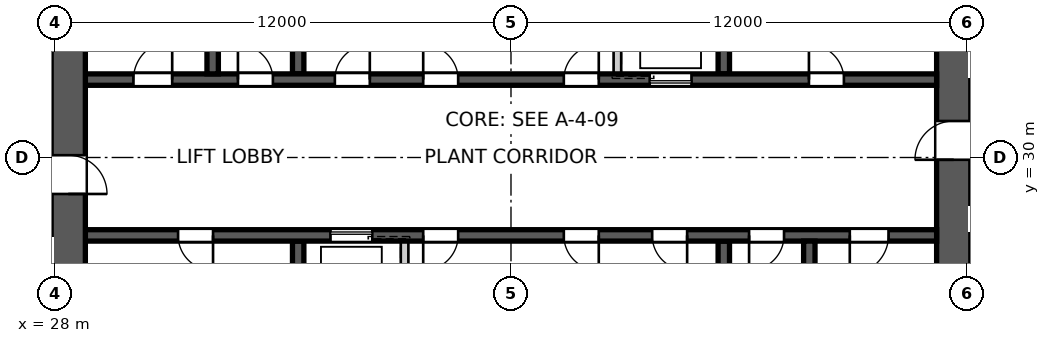
"""IFC4 building model, lengths in metres.
Left out: names, types, materials, properties, quantities, classifications, styles, units other than length and angle.
Written with IfcOpenShell. Run it as: python <this file> out.ifc"""

import sys

from ifc_helpers import new_model, si_unit, direction, frame, frame_2d, origin, place, context, subcontext, project, spatial, polyline, rectangle, outline, extrude, element, fill, save


model = new_model("IFC4")
c1 = context("Model", 3, precision=1e-05, world=origin(), true_north=direction((0.0, 1.0)))
c2 = subcontext(c1, "Body", "Model", "MODEL_VIEW")
j1 = project(units=[si_unit("LENGTHUNIT", "METRE"), si_unit("PLANEANGLEUNIT", "RADIAN")], contexts=[c1])
p1 = place(None, origin())
s1 = spatial("IfcSite", under=j1, at=p1, CompositionType="ELEMENT")
p2 = place(p1, origin())
s2 = spatial("IfcBuilding", under=s1, at=p2, CompositionType="ELEMENT")
p3 = place(p2, frame((0.0, 0.0, 304.3)))
s3 = spatial("IfcBuildingStorey", under=s2, at=p3, CompositionType="ELEMENT", Elevation=304.3)
p4 = place(p3, frame((51.65, 18.8, 0.0), z_axis=(0.0, 0.0, 1.0), x_axis=(0.0, 1.0, 0.0)))
e1 = element("IfcWall", 1, at=p4, inside=s3, PredefinedType="SHEAR", context=c2, shape_type="SweptSolid", body=[
    extrude(outline(polyline([(0.0, -0.45), (22.4, -0.45), (22.4, -0.025), (22.85, -0.025), (22.85, 0.025), (22.4, 0.025), (22.4, 0.45), (0.0, 0.45), (0.0, 0.025), (-0.45, 0.025), (-0.45, -0.025), (0.0, -0.025), (0.0, -0.45)])), origin(), (0.0, 0.0, 1.0), 4.5),
])
p5 = place(p4, frame((11.14, 0.0, 0.0)))
e2 = element("IfcOpeningElement", 2, at=p5, cuts=e1, PredefinedType="OPENING", context=c2, shape_type="SweptSolid", body=[
    extrude(rectangle(XDim=1.02, YDim=2.4, at=frame_2d((0.51, 1.2))), frame((0.0, 0.46, 0.0), z_axis=(0.0, -1.0, 0.0), x_axis=(1.0, 0.0, 0.0)), (0.0, 0.0, 1.0), 0.92),
])
p6 = place(p3, frame((28.35, 41.2, 0.0), z_axis=(0.0, 0.0, 1.0), x_axis=(0.0, -1.0, 0.0)))
e3 = element("IfcWall", 3, at=p6, inside=s3, PredefinedType="SHEAR", context=c2, shape_type="SweptSolid", body=[
    extrude(outline(polyline([(0.0, -0.45), (22.4, -0.45), (22.4, -0.025), (22.85, -0.025), (22.85, 0.025), (22.4, 0.025), (22.4, 0.45), (0.0, 0.45), (0.0, 0.025), (-0.45, 0.025), (-0.45, -0.025), (0.0, -0.025), (0.0, -0.45)])), origin(), (0.0, 0.0, 1.0), 4.5),
])
p7 = place(p6, frame((11.14, 0.0, 0.0)))
e4 = element("IfcOpeningElement", 4, at=p7, cuts=e3, PredefinedType="OPENING", context=c2, shape_type="SweptSolid", body=[
    extrude(rectangle(XDim=1.02, YDim=2.4, at=frame_2d((0.51, 1.2))), frame((0.0, 0.46, 0.0), z_axis=(0.0, -1.0, 0.0), x_axis=(1.0, 0.0, 0.0)), (0.0, 0.0, 1.0), 0.92),
])
p8 = place(p3, frame((28.8, 32.05, 0.0), z_axis=(0.0, 0.0, 1.0), x_axis=(1.0, 0.0, 0.0)))
e5 = element("IfcWall", 5, at=p8, inside=s3, PredefinedType="SHEAR", context=c2, shape_type="SweptSolid", body=[
    extrude(rectangle(XDim=22.4, YDim=0.3, at=frame_2d((11.2, 0.0))), origin(), (0.0, 0.0, 1.0), 4.5),
])
p9 = place(p8, frame((19.04, 0.0, 0.0)))
e6 = element("IfcOpeningElement", 6, at=p9, cuts=e5, PredefinedType="OPENING", context=c2, shape_type="SweptSolid", body=[
    extrude(rectangle(XDim=0.92, YDim=2.1, at=frame_2d((0.46, 1.05))), frame((0.0, 0.16, 0.0), z_axis=(0.0, -1.0, 0.0), x_axis=(1.0, 0.0, 0.0)), (0.0, 0.0, 1.0), 0.32),
])
p10 = place(p8, frame((1.265, 0.0, 0.0)))
e7 = element("IfcOpeningElement", 7, at=p10, cuts=e5, PredefinedType="OPENING", context=c2, shape_type="SweptSolid", body=[
    extrude(rectangle(XDim=1.02, YDim=2.1, at=frame_2d((0.51, 1.05))), frame((0.0, 0.16, 0.0), z_axis=(0.0, -1.0, 0.0), x_axis=(1.0, 0.0, 0.0)), (0.0, 0.0, 1.0), 0.32),
])
p11 = place(p8, frame((4.015, 0.0, 0.0)))
e8 = element("IfcOpeningElement", 8, at=p11, cuts=e5, PredefinedType="OPENING", context=c2, shape_type="SweptSolid", body=[
    extrude(rectangle(XDim=0.92, YDim=2.1, at=frame_2d((0.46, 1.05))), frame((0.0, 0.16, 0.0), z_axis=(0.0, -1.0, 0.0), x_axis=(1.0, 0.0, 0.0)), (0.0, 0.0, 1.0), 0.32),
])
p12 = place(p8, frame((6.565, 0.0, 0.0)))
e9 = element("IfcOpeningElement", 9, at=p12, cuts=e5, PredefinedType="OPENING", context=c2, shape_type="SweptSolid", body=[
    extrude(rectangle(XDim=0.92, YDim=2.1, at=frame_2d((0.46, 1.05))), frame((0.0, 0.16, 0.0), z_axis=(0.0, -1.0, 0.0), x_axis=(1.0, 0.0, 0.0)), (0.0, 0.0, 1.0), 0.32),
])
p13 = place(p8, frame((8.89, 0.0, 0.0)))
e10 = element("IfcOpeningElement", 10, at=p13, cuts=e5, PredefinedType="OPENING", context=c2, shape_type="SweptSolid", body=[
    extrude(rectangle(XDim=0.92, YDim=2.1, at=frame_2d((0.46, 1.05))), frame((0.0, 0.16, 0.0), z_axis=(0.0, -1.0, 0.0), x_axis=(1.0, 0.0, 0.0)), (0.0, 0.0, 1.0), 0.32),
])
p14 = place(p8, frame((12.59, 0.0, 0.0)))
e11 = element("IfcOpeningElement", 11, at=p14, cuts=e5, PredefinedType="OPENING", context=c2, shape_type="SweptSolid", body=[
    extrude(rectangle(XDim=0.92, YDim=2.1, at=frame_2d((0.46, 1.05))), frame((0.0, 0.16, 0.0), z_axis=(0.0, -1.0, 0.0), x_axis=(1.0, 0.0, 0.0)), (0.0, 0.0, 1.0), 0.32),
])
p15 = place(p8, frame((14.85, 0.0, 0.0)))
e12 = element("IfcOpeningElement", 12, at=p15, cuts=e5, PredefinedType="OPENING", context=c2, shape_type="SweptSolid", body=[
    extrude(rectangle(XDim=1.1, YDim=2.1, at=frame_2d((0.55, 1.05))), frame((0.0, 0.16, 0.0), z_axis=(0.0, -1.0, 0.0), x_axis=(1.0, 0.0, 0.0)), (0.0, 0.0, 1.0), 0.32),
])
p16 = place(p3, frame((51.2, 27.95, 0.0), z_axis=(0.0, 0.0, 1.0), x_axis=(-1.0, 0.0, 0.0)))
e13 = element("IfcWall", 13, at=p16, inside=s3, PredefinedType="SHEAR", context=c2, shape_type="SweptSolid", body=[
    extrude(rectangle(XDim=22.4, YDim=0.3, at=frame_2d((11.2, 0.0))), origin(), (0.0, 0.0, 1.0), 4.5),
])
p17 = place(p16, frame((19.04, 0.0, 0.0)))
e14 = element("IfcOpeningElement", 14, at=p17, cuts=e13, PredefinedType="OPENING", context=c2, shape_type="SweptSolid", body=[
    extrude(rectangle(XDim=0.92, YDim=2.1, at=frame_2d((0.46, 1.05))), frame((0.0, 0.16, 0.0), z_axis=(0.0, -1.0, 0.0), x_axis=(1.0, 0.0, 0.0)), (0.0, 0.0, 1.0), 0.32),
])
p18 = place(p16, frame((1.265, 0.0, 0.0)))
e15 = element("IfcOpeningElement", 15, at=p18, cuts=e13, PredefinedType="OPENING", context=c2, shape_type="SweptSolid", body=[
    extrude(rectangle(XDim=1.02, YDim=2.1, at=frame_2d((0.51, 1.05))), frame((0.0, 0.16, 0.0), z_axis=(0.0, -1.0, 0.0), x_axis=(1.0, 0.0, 0.0)), (0.0, 0.0, 1.0), 0.32),
])
p19 = place(p16, frame((4.015, 0.0, 0.0)))
e16 = element("IfcOpeningElement", 16, at=p19, cuts=e13, PredefinedType="OPENING", context=c2, shape_type="SweptSolid", body=[
    extrude(rectangle(XDim=0.92, YDim=2.1, at=frame_2d((0.46, 1.05))), frame((0.0, 0.16, 0.0), z_axis=(0.0, -1.0, 0.0), x_axis=(1.0, 0.0, 0.0)), (0.0, 0.0, 1.0), 0.32),
])
p20 = place(p16, frame((12.59, 0.0, 0.0)))
e17 = element("IfcOpeningElement", 17, at=p20, cuts=e13, PredefinedType="OPENING", context=c2, shape_type="SweptSolid", body=[
    extrude(rectangle(XDim=0.92, YDim=2.1, at=frame_2d((0.46, 1.05))), frame((0.0, 0.16, 0.0), z_axis=(0.0, -1.0, 0.0), x_axis=(1.0, 0.0, 0.0)), (0.0, 0.0, 1.0), 0.32),
])
p21 = place(p16, frame((8.89, 0.0, 0.0)))
e18 = element("IfcOpeningElement", 18, at=p21, cuts=e13, PredefinedType="OPENING", context=c2, shape_type="SweptSolid", body=[
    extrude(rectangle(XDim=0.92, YDim=2.1, at=frame_2d((0.46, 1.05))), frame((0.0, 0.16, 0.0), z_axis=(0.0, -1.0, 0.0), x_axis=(1.0, 0.0, 0.0)), (0.0, 0.0, 1.0), 0.32),
])
p22 = place(p16, frame((6.565, 0.0, 0.0)))
e19 = element("IfcOpeningElement", 19, at=p22, cuts=e13, PredefinedType="OPENING", context=c2, shape_type="SweptSolid", body=[
    extrude(rectangle(XDim=0.92, YDim=2.1, at=frame_2d((0.46, 1.05))), frame((0.0, 0.16, 0.0), z_axis=(0.0, -1.0, 0.0), x_axis=(1.0, 0.0, 0.0)), (0.0, 0.0, 1.0), 0.32),
])
p23 = place(p16, frame((14.85, 0.0, 0.0)))
e20 = element("IfcOpeningElement", 20, at=p23, cuts=e13, PredefinedType="OPENING", context=c2, shape_type="SweptSolid", body=[
    extrude(rectangle(XDim=1.1, YDim=2.1, at=frame_2d((0.55, 1.05))), frame((0.0, 0.16, 0.0), z_axis=(0.0, -1.0, 0.0), x_axis=(1.0, 0.0, 0.0)), (0.0, 0.0, 1.0), 0.32),
])
for number, where, z_axis, x_axis in (
    (21, (34.4, 32.2, 0.0), (0.0, 0.0, 1.0), (0.0, 1.0, 0.0)),
    (22, (45.6, 27.8, 0.0), (0.0, 0.0, 1.0), (0.0, -1.0, 0.0)),
):
    element("IfcWall", number, at=place(p3, frame(where, z_axis=z_axis, x_axis=x_axis)), inside=s3, PredefinedType="SHEAR", context=c2, shape_type="SweptSolid", body=[
        extrude(rectangle(XDim=2.8, YDim=0.3, at=frame_2d((1.4, 0.0))), origin(), (0.0, 0.0, 1.0), 4.5),
    ])
for number, where, z_axis, x_axis in (
    (23, (42.8, 32.2, 0.0), (0.0, 0.0, 1.0), (0.0, 1.0, 0.0)),
    (24, (37.2, 27.8, 0.0), (0.0, 0.0, 1.0), (0.0, -1.0, 0.0)),
):
    element("IfcWall", number, at=place(p3, frame(where, z_axis=z_axis, x_axis=x_axis)), inside=s3, PredefinedType="SOLIDWALL", context=c2, shape_type="SweptSolid", body=[
        extrude(rectangle(XDim=2.8, YDim=0.2, at=frame_2d((1.4, 0.0))), origin(), (0.0, 0.0, 1.0), 4.5),
    ])
for number, where, z_axis, x_axis in (
    (25, (45.6, 32.2, 0.0), (0.0, 0.0, 1.0), (0.0, 1.0, 0.0)),
    (26, (34.4, 27.8, 0.0), (0.0, 0.0, 1.0), (0.0, -1.0, 0.0)),
):
    element("IfcWall", number, at=place(p3, frame(where, z_axis=z_axis, x_axis=x_axis)), inside=s3, PredefinedType="SHEAR", context=c2, shape_type="SweptSolid", body=[
        extrude(rectangle(XDim=2.8, YDim=0.3, at=frame_2d((1.4, 0.0))), origin(), (0.0, 0.0, 1.0), 4.5),
    ])
for number, where, z_axis, x_axis in (
    (27, (32.15, 32.2, 0.0), (0.0, 0.0, 1.0), (0.0, 1.0, 0.0)),
    (28, (47.85, 27.8, 0.0), (0.0, 0.0, 1.0), (0.0, -1.0, 0.0)),
):
    element("IfcWall", number, at=place(p3, frame(where, z_axis=z_axis, x_axis=x_axis)), inside=s3, PredefinedType="SHEAR", context=c2, shape_type="SweptSolid", body=[
        extrude(rectangle(XDim=7.7, YDim=0.3, at=frame_2d((3.85, 0.0))), origin(), (0.0, 0.0, 1.0), 4.5),
    ])
p24 = place(p9, origin())
e29 = element("IfcDoor", 29, at=p24, inside=s3, OperationType="SINGLE_SWING_LEFT", PredefinedType="DOOR", context=c2, shape_type="SweptSolid", body=[
    extrude(rectangle(XDim=0.92, YDim=2.1, at=frame_2d((0.46, 1.05))), frame((0.0, 0.025, 0.0), z_axis=(0.0, -1.0, 0.0), x_axis=(1.0, 0.0, 0.0)), (0.0, 0.0, 1.0), 0.05),
])
fill(e6, e29)
p25 = place(p17, origin())
e30 = element("IfcDoor", 30, at=p25, inside=s3, OperationType="SINGLE_SWING_LEFT", PredefinedType="DOOR", context=c2, shape_type="SweptSolid", body=[
    extrude(rectangle(XDim=0.92, YDim=2.1, at=frame_2d((0.46, 1.05))), frame((0.0, 0.025, 0.0), z_axis=(0.0, -1.0, 0.0), x_axis=(1.0, 0.0, 0.0)), (0.0, 0.0, 1.0), 0.05),
])
fill(e14, e30)
p26 = place(p18, origin())
e31 = element("IfcDoor", 31, at=p26, inside=s3, OperationType="SINGLE_SWING_RIGHT", PredefinedType="DOOR", context=c2, shape_type="SweptSolid", body=[
    extrude(rectangle(XDim=1.02, YDim=2.1, at=frame_2d((0.51, 1.05))), frame((0.0, 0.025, 0.0), z_axis=(0.0, -1.0, 0.0), x_axis=(1.0, 0.0, 0.0)), (0.0, 0.0, 1.0), 0.05),
])
fill(e15, e31)
p27 = place(p10, origin())
e32 = element("IfcDoor", 32, at=p27, inside=s3, OperationType="SINGLE_SWING_RIGHT", PredefinedType="DOOR", context=c2, shape_type="SweptSolid", body=[
    extrude(rectangle(XDim=1.02, YDim=2.1, at=frame_2d((0.51, 1.05))), frame((0.0, 0.025, 0.0), z_axis=(0.0, -1.0, 0.0), x_axis=(1.0, 0.0, 0.0)), (0.0, 0.0, 1.0), 0.05),
])
fill(e7, e32)
p28 = place(p11, origin())
e33 = element("IfcDoor", 33, at=p28, inside=s3, OperationType="SINGLE_SWING_LEFT", PredefinedType="DOOR", context=c2, shape_type="SweptSolid", body=[
    extrude(rectangle(XDim=0.92, YDim=2.1, at=frame_2d((0.46, 1.05))), frame((0.0, 0.025, 0.0), z_axis=(0.0, -1.0, 0.0), x_axis=(1.0, 0.0, 0.0)), (0.0, 0.0, 1.0), 0.05),
])
fill(e8, e33)
p29 = place(p19, origin())
e34 = element("IfcDoor", 34, at=p29, inside=s3, OperationType="SINGLE_SWING_RIGHT", PredefinedType="DOOR", context=c2, shape_type="SweptSolid", body=[
    extrude(rectangle(XDim=0.92, YDim=2.1, at=frame_2d((0.46, 1.05))), frame((0.0, 0.025, 0.0), z_axis=(0.0, -1.0, 0.0), x_axis=(1.0, 0.0, 0.0)), (0.0, 0.0, 1.0), 0.05),
])
fill(e16, e34)
p30 = place(p12, origin())
e35 = element("IfcDoor", 35, at=p30, inside=s3, OperationType="SINGLE_SWING_RIGHT", PredefinedType="DOOR", context=c2, shape_type="SweptSolid", body=[
    extrude(rectangle(XDim=0.92, YDim=2.1, at=frame_2d((0.46, 1.05))), frame((0.0, 0.025, 0.0), z_axis=(0.0, -1.0, 0.0), x_axis=(1.0, 0.0, 0.0)), (0.0, 0.0, 1.0), 0.05),
])
fill(e9, e35)
p31 = place(p13, origin())
e36 = element("IfcDoor", 36, at=p31, inside=s3, OperationType="SINGLE_SWING_LEFT", PredefinedType="DOOR", context=c2, shape_type="SweptSolid", body=[
    extrude(rectangle(XDim=0.92, YDim=2.1, at=frame_2d((0.46, 1.05))), frame((0.0, 0.025, 0.0), z_axis=(0.0, -1.0, 0.0), x_axis=(1.0, 0.0, 0.0)), (0.0, 0.0, 1.0), 0.05),
])
fill(e10, e36)
p32 = place(p14, origin())
e37 = element("IfcDoor", 37, at=p32, inside=s3, OperationType="SINGLE_SWING_RIGHT", PredefinedType="DOOR", context=c2, shape_type="SweptSolid", body=[
    extrude(rectangle(XDim=0.92, YDim=2.1, at=frame_2d((0.46, 1.05))), frame((0.0, 0.025, 0.0), z_axis=(0.0, -1.0, 0.0), x_axis=(1.0, 0.0, 0.0)), (0.0, 0.0, 1.0), 0.05),
])
fill(e11, e37)
p33 = place(p20, origin())
e38 = element("IfcDoor", 38, at=p33, inside=s3, OperationType="SINGLE_SWING_RIGHT", PredefinedType="DOOR", context=c2, shape_type="SweptSolid", body=[
    extrude(rectangle(XDim=0.92, YDim=2.1, at=frame_2d((0.46, 1.05))), frame((0.0, 0.025, 0.0), z_axis=(0.0, -1.0, 0.0), x_axis=(1.0, 0.0, 0.0)), (0.0, 0.0, 1.0), 0.05),
])
fill(e17, e38)
p34 = place(p21, origin())
e39 = element("IfcDoor", 39, at=p34, inside=s3, OperationType="SINGLE_SWING_LEFT", PredefinedType="DOOR", context=c2, shape_type="SweptSolid", body=[
    extrude(rectangle(XDim=0.92, YDim=2.1, at=frame_2d((0.46, 1.05))), frame((0.0, 0.025, 0.0), z_axis=(0.0, -1.0, 0.0), x_axis=(1.0, 0.0, 0.0)), (0.0, 0.0, 1.0), 0.05),
])
fill(e18, e39)
p35 = place(p22, origin())
e40 = element("IfcDoor", 40, at=p35, inside=s3, OperationType="SINGLE_SWING_LEFT", PredefinedType="DOOR", context=c2, shape_type="SweptSolid", body=[
    extrude(rectangle(XDim=0.92, YDim=2.1, at=frame_2d((0.46, 1.05))), frame((0.0, 0.025, 0.0), z_axis=(0.0, -1.0, 0.0), x_axis=(1.0, 0.0, 0.0)), (0.0, 0.0, 1.0), 0.05),
])
fill(e19, e40)
p36 = place(p5, origin())
e41 = element("IfcDoor", 41, at=p36, inside=s3, OperationType="SINGLE_SWING_LEFT", PredefinedType="DOOR", context=c2, shape_type="SweptSolid", body=[
    extrude(rectangle(XDim=1.02, YDim=2.4, at=frame_2d((0.51, 1.2))), frame((0.0, 0.025, 0.0), z_axis=(0.0, -1.0, 0.0), x_axis=(1.0, 0.0, 0.0)), (0.0, 0.0, 1.0), 0.05),
])
fill(e2, e41)
p37 = place(p7, origin())
e42 = element("IfcDoor", 42, at=p37, inside=s3, OperationType="SINGLE_SWING_RIGHT", PredefinedType="DOOR", context=c2, shape_type="SweptSolid", body=[
    extrude(rectangle(XDim=1.02, YDim=2.4, at=frame_2d((0.51, 1.2))), frame((0.0, 0.025, 0.0), z_axis=(0.0, -1.0, 0.0), x_axis=(1.0, 0.0, 0.0)), (0.0, 0.0, 1.0), 0.05),
])
fill(e4, e42)
p38 = place(p15, origin())
e43 = element("IfcDoor", 43, at=p38, inside=s3, OperationType="SLIDING_TO_LEFT", PredefinedType="DOOR", context=c2, shape_type="SweptSolid", body=[
    extrude(rectangle(XDim=1.1, YDim=2.1, at=frame_2d((0.55, 1.05))), frame((0.0, 0.025, 0.0), z_axis=(0.0, -1.0, 0.0), x_axis=(1.0, 0.0, 0.0)), (0.0, 0.0, 1.0), 0.05),
])
fill(e12, e43)
p39 = place(p23, origin())
e44 = element("IfcDoor", 44, at=p39, inside=s3, OperationType="SLIDING_TO_LEFT", PredefinedType="DOOR", context=c2, shape_type="SweptSolid", body=[
    extrude(rectangle(XDim=1.1, YDim=2.1, at=frame_2d((0.55, 1.05))), frame((0.0, 0.025, 0.0), z_axis=(0.0, -1.0, 0.0), x_axis=(1.0, 0.0, 0.0)), (0.0, 0.0, 1.0), 0.05),
])
fill(e20, e44)
save(model, sys.argv[1])
